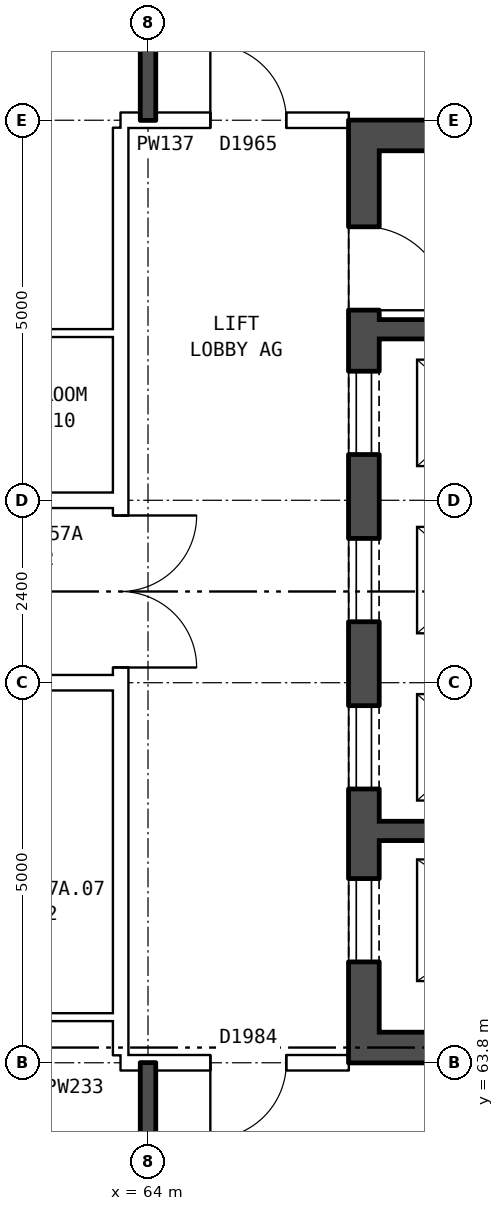
"""IFC4 building model, lengths in metres.
Left out: names, types, materials, properties, quantities, classifications, styles, units other than length and angle.
Written with IfcOpenShell. Run it as: python <this file> out.ifc"""

import sys

from ifc_helpers import new_model, si_unit, direction, frame, frame_2d, origin, place, context, subcontext, project, spatial, rectangle, extrude, element, fill, save


model = new_model("IFC4")
c1 = context("Model", 3, precision=1e-05, world=origin(), true_north=direction((0.0, 1.0)))
c2 = subcontext(c1, "Body", "Model", "MODEL_VIEW")
j1 = project(units=[si_unit("LENGTHUNIT", "METRE"), si_unit("PLANEANGLEUNIT", "RADIAN")], contexts=[c1])
p1 = place(None, origin())
s1 = spatial("IfcSite", under=j1, at=p1, CompositionType="ELEMENT")
p2 = place(p1, origin())
s2 = spatial("IfcBuilding", under=s1, at=p2, CompositionType="ELEMENT")
p3 = place(p2, frame((0.0, 0.0, 202.8)))
s3 = spatial("IfcBuildingStorey", under=s2, at=p3, CompositionType="ELEMENT", Elevation=202.8)
p4 = place(p3, frame((66.84, 63.8, 0.0), z_axis=(0.0, 0.0, 1.0), x_axis=(0.0, 1.0, 0.0)))
e1 = element("IfcWall", 1, at=p4, inside=s3, PredefinedType="SHEAR", context=c2, shape_type="SweptSolid", body=[
    extrude(rectangle(XDim=12.4, YDim=0.4, at=frame_2d((6.2, 0.0))), origin(), (0.0, 0.0, 1.0), 2.85),
])
p5 = place(p4, frame((1.325, 0.0, 0.0)))
e2 = element("IfcOpeningElement", 2, at=p5, cuts=e1, PredefinedType="OPENING", context=c2, shape_type="SweptSolid", body=[
    extrude(rectangle(XDim=1.1, YDim=2.1, at=frame_2d((0.55, 1.05))), frame((0.0, 0.21, 0.0), z_axis=(0.0, -1.0, 0.0), x_axis=(1.0, 0.0, 0.0)), (0.0, 0.0, 1.0), 0.42),
])
p6 = place(p4, frame((3.6, 0.0, 0.0)))
e3 = element("IfcOpeningElement", 3, at=p6, cuts=e1, PredefinedType="OPENING", context=c2, shape_type="SweptSolid", body=[
    extrude(rectangle(XDim=1.1, YDim=2.1, at=frame_2d((0.55, 1.05))), frame((0.0, 0.21, 0.0), z_axis=(0.0, -1.0, 0.0), x_axis=(1.0, 0.0, 0.0)), (0.0, 0.0, 1.0), 0.42),
])
p7 = place(p4, frame((5.8, 0.0, 0.0)))
e4 = element("IfcOpeningElement", 4, at=p7, cuts=e1, PredefinedType="OPENING", context=c2, shape_type="SweptSolid", body=[
    extrude(rectangle(XDim=1.1, YDim=2.1, at=frame_2d((0.55, 1.05))), frame((0.0, 0.21, 0.0), z_axis=(0.0, -1.0, 0.0), x_axis=(1.0, 0.0, 0.0)), (0.0, 0.0, 1.0), 0.42),
])
p8 = place(p4, frame((8.0, 0.0, 0.0)))
e5 = element("IfcOpeningElement", 5, at=p8, cuts=e1, PredefinedType="OPENING", context=c2, shape_type="SweptSolid", body=[
    extrude(rectangle(XDim=1.1, YDim=2.1, at=frame_2d((0.55, 1.05))), frame((0.0, 0.21, 0.0), z_axis=(0.0, -1.0, 0.0), x_axis=(1.0, 0.0, 0.0)), (0.0, 0.0, 1.0), 0.42),
])
p9 = place(p4, frame((9.9, 0.0, 0.0)))
e6 = element("IfcOpeningElement", 6, at=p9, cuts=e1, PredefinedType="OPENING", context=c2, shape_type="SweptSolid", body=[
    extrude(rectangle(XDim=1.1, YDim=2.1, at=frame_2d((0.55, 1.05))), frame((0.0, 0.21, 0.0), z_axis=(0.0, -1.0, 0.0), x_axis=(1.0, 0.0, 0.0)), (0.0, 0.0, 1.0), 0.42),
])
for number, where, z_axis, x_axis in (
    (7, (67.04, 64.0, 0.0), (0.0, 0.0, 1.0), (1.0, 0.0, 0.0)),
    (8, (67.04, 76.0, 0.0), (0.0, 0.0, 1.0), (1.0, 0.0, 0.0)),
):
    element("IfcWall", number, at=place(p3, frame(where, z_axis=z_axis, x_axis=x_axis)), inside=s3, PredefinedType="SHEAR", context=c2, shape_type="SweptSolid", body=[
        extrude(rectangle(XDim=8.2, YDim=0.4, at=frame_2d((4.1, 0.0))), origin(), (0.0, 0.0, 1.0), 2.85),
    ])
p10 = place(p3, frame((67.04, 66.85, 0.0), z_axis=(0.0, 0.0, 1.0), x_axis=(1.0, 0.0, 0.0)))
e9 = element("IfcWall", 9, at=p10, inside=s3, PredefinedType="SHEAR", context=c2, shape_type="SweptSolid", body=[
    extrude(rectangle(XDim=3.595, YDim=0.25, at=frame_2d((1.797, 0.0))), origin(), (0.0, 0.0, 1.0), 2.85),
])
p11 = place(p3, frame((67.04, 73.45, 0.0), z_axis=(0.0, 0.0, 1.0), x_axis=(1.0, 0.0, 0.0)))
e10 = element("IfcWall", 10, at=p11, inside=s3, PredefinedType="SHEAR", context=c2, shape_type="SweptSolid", body=[
    extrude(rectangle(XDim=2.525, YDim=0.25, at=frame_2d((1.262, 0.0))), origin(), (0.0, 0.0, 1.0), 2.85),
])
p12 = place(p3, frame((63.64, 63.9, 0.0), z_axis=(0.0, 0.0, 1.0), x_axis=(0.0, 1.0, 0.0)))
e11 = element("IfcWall", 11, at=p12, inside=s3, PredefinedType="PARTITIONING", context=c2, shape_type="SweptSolid", body=[
    extrude(rectangle(XDim=12.2, YDim=0.2, at=frame_2d((6.1, 0.0))), origin(), (0.0, 0.0, 1.0), 2.85),
])
p13 = place(p12, frame((5.1, 0.0, 0.0)))
e12 = element("IfcOpeningElement", 12, at=p13, cuts=e11, PredefinedType="OPENING", context=c2, shape_type="SweptSolid", body=[
    extrude(rectangle(XDim=2.0, YDim=2.1, at=frame_2d((1.0, 1.05))), frame((0.0, 0.11, 0.0), z_axis=(0.0, -1.0, 0.0), x_axis=(1.0, 0.0, 0.0)), (0.0, 0.0, 1.0), 0.22),
])
p14 = place(p3, frame((63.64, 63.8, 0.0), z_axis=(0.0, 0.0, 1.0), x_axis=(1.0, 0.0, 0.0)))
e13 = element("IfcWall", 13, at=p14, inside=s3, PredefinedType="PARTITIONING", context=c2, shape_type="SweptSolid", body=[
    extrude(rectangle(XDim=3.0, YDim=0.2, at=frame_2d((1.5, 0.0))), origin(), (0.0, 0.0, 1.0), 2.85),
])
p15 = place(p14, frame((1.18, 0.0, 0.0)))
e14 = element("IfcOpeningElement", 14, at=p15, cuts=e13, PredefinedType="OPENING", context=c2, shape_type="SweptSolid", body=[
    extrude(rectangle(XDim=1.0, YDim=2.1, at=frame_2d((0.5, 1.05))), frame((0.0, 0.11, 0.0), z_axis=(0.0, -1.0, 0.0), x_axis=(1.0, 0.0, 0.0)), (0.0, 0.0, 1.0), 0.22),
])
p16 = place(p3, frame((61.0, 64.4, 0.0), z_axis=(0.0, 0.0, 1.0), x_axis=(1.0, 0.0, 0.0)))
e15 = element("IfcWall", 15, at=p16, inside=s3, PredefinedType="PARTITIONING", context=c2, shape_type="SweptSolid", body=[
    extrude(rectangle(XDim=2.64, YDim=0.1, at=frame_2d((1.32, 0.0))), origin(), (0.0, 0.0, 1.0), 2.85),
])
p17 = place(p3, frame((44.36, 68.8, 0.0), z_axis=(0.0, 0.0, 1.0), x_axis=(1.0, 0.0, 0.0)))
e16 = element("IfcWall", 16, at=p17, inside=s3, PredefinedType="PARTITIONING", context=c2, shape_type="SweptSolid", body=[
    extrude(rectangle(XDim=19.28, YDim=0.2, at=frame_2d((9.64, 0.0))), origin(), (0.0, 0.0, 1.0), 2.85),
])
p18 = place(p17, frame((14.64, 0.0, 0.0)))
e17 = element("IfcOpeningElement", 17, at=p18, cuts=e16, PredefinedType="OPENING", context=c2, shape_type="SweptSolid", body=[
    extrude(rectangle(XDim=1.0, YDim=2.1, at=frame_2d((0.5, 1.05))), frame((0.0, 0.11, 0.0), z_axis=(0.0, -1.0, 0.0), x_axis=(1.0, 0.0, 0.0)), (0.0, 0.0, 1.0), 0.22),
])
p19 = place(p17, frame((8.64, 0.0, 0.0)))
e18 = element("IfcOpeningElement", 18, at=p19, cuts=e16, PredefinedType="OPENING", context=c2, shape_type="SweptSolid", body=[
    extrude(rectangle(XDim=1.0, YDim=2.1, at=frame_2d((0.5, 1.05))), frame((0.0, 0.11, 0.0), z_axis=(0.0, -1.0, 0.0), x_axis=(1.0, 0.0, 0.0)), (0.0, 0.0, 1.0), 0.22),
])
p20 = place(p17, frame((2.64, 0.0, 0.0)))
e19 = element("IfcOpeningElement", 19, at=p20, cuts=e16, PredefinedType="OPENING", context=c2, shape_type="SweptSolid", body=[
    extrude(rectangle(XDim=1.0, YDim=2.1, at=frame_2d((0.5, 1.05))), frame((0.0, 0.11, 0.0), z_axis=(0.0, -1.0, 0.0), x_axis=(1.0, 0.0, 0.0)), (0.0, 0.0, 1.0), 0.22),
])
p21 = place(p3, frame((44.36, 71.2, 0.0), z_axis=(0.0, 0.0, 1.0), x_axis=(1.0, 0.0, 0.0)))
e20 = element("IfcWall", 20, at=p21, inside=s3, PredefinedType="PARTITIONING", context=c2, shape_type="SweptSolid", body=[
    extrude(rectangle(XDim=19.28, YDim=0.2, at=frame_2d((9.64, 0.0))), origin(), (0.0, 0.0, 1.0), 2.85),
])
p22 = place(p21, frame((14.64, 0.0, 0.0)))
e21 = element("IfcOpeningElement", 21, at=p22, cuts=e20, PredefinedType="OPENING", context=c2, shape_type="SweptSolid", body=[
    extrude(rectangle(XDim=1.0, YDim=2.1, at=frame_2d((0.5, 1.05))), frame((0.0, 0.11, 0.0), z_axis=(0.0, -1.0, 0.0), x_axis=(1.0, 0.0, 0.0)), (0.0, 0.0, 1.0), 0.22),
])
p23 = place(p21, frame((5.64, 0.0, 0.0)))
e22 = element("IfcOpeningElement", 22, at=p23, cuts=e20, PredefinedType="OPENING", context=c2, shape_type="SweptSolid", body=[
    extrude(rectangle(XDim=1.0, YDim=2.1, at=frame_2d((0.5, 1.05))), frame((0.0, 0.11, 0.0), z_axis=(0.0, -1.0, 0.0), x_axis=(1.0, 0.0, 0.0)), (0.0, 0.0, 1.0), 0.22),
])
p24 = place(p3, frame((61.0, 73.4, 0.0), z_axis=(0.0, 0.0, 1.0), x_axis=(1.0, 0.0, 0.0)))
e23 = element("IfcWall", 23, at=p24, inside=s3, PredefinedType="PARTITIONING", context=c2, shape_type="SweptSolid", body=[
    extrude(rectangle(XDim=2.64, YDim=0.1, at=frame_2d((1.32, 0.0))), origin(), (0.0, 0.0, 1.0), 2.85),
])
p25 = place(p3, frame((63.64, 76.2, 0.0), z_axis=(0.0, 0.0, 1.0), x_axis=(1.0, 0.0, 0.0)))
e24 = element("IfcWall", 24, at=p25, inside=s3, PredefinedType="PARTITIONING", context=c2, shape_type="SweptSolid", body=[
    extrude(rectangle(XDim=3.0, YDim=0.2, at=frame_2d((1.5, 0.0))), origin(), (0.0, 0.0, 1.0), 2.85),
])
p26 = place(p25, frame((1.18, 0.0, 0.0)))
e25 = element("IfcOpeningElement", 25, at=p26, cuts=e24, PredefinedType="OPENING", context=c2, shape_type="SweptSolid", body=[
    extrude(rectangle(XDim=1.0, YDim=2.1, at=frame_2d((0.5, 1.05))), frame((0.0, 0.11, 0.0), z_axis=(0.0, -1.0, 0.0), x_axis=(1.0, 0.0, 0.0)), (0.0, 0.0, 1.0), 0.22),
])
for number, where, z_axis, x_axis in (
    (26, (64.0, 54.36, 0.0), (0.0, 0.0, 1.0), (0.0, 1.0, 0.0)),
    (27, (64.0, 76.2, 0.0), (0.0, 0.0, 1.0), (0.0, 1.0, 0.0)),
):
    element("IfcWall", number, at=place(p3, frame(where, z_axis=z_axis, x_axis=x_axis)), inside=s3, PredefinedType="SOLIDWALL", context=c2, shape_type="SweptSolid", body=[
        extrude(rectangle(XDim=9.44, YDim=0.2, at=frame_2d((4.72, 0.0))), origin(), (0.0, 0.0, 1.0), 2.85),
    ])
p27 = place(p5, origin())
e28 = element("IfcDoor", 28, at=p27, inside=s3, OperationType="DOUBLE_DOOR_SLIDING", PredefinedType="DOOR", context=c2, shape_type="SweptSolid", body=[
    extrude(rectangle(XDim=1.1, YDim=2.1, at=frame_2d((0.55, 1.05))), frame((0.0, -0.135, 0.0), z_axis=(0.0, -1.0, 0.0), x_axis=(1.0, 0.0, 0.0)), (0.0, 0.0, 1.0), 0.05),
])
fill(e2, e28)
p28 = place(p6, origin())
e29 = element("IfcDoor", 29, at=p28, inside=s3, OperationType="DOUBLE_DOOR_SLIDING", PredefinedType="DOOR", context=c2, shape_type="SweptSolid", body=[
    extrude(rectangle(XDim=1.1, YDim=2.1, at=frame_2d((0.55, 1.05))), frame((0.0, -0.135, 0.0), z_axis=(0.0, -1.0, 0.0), x_axis=(1.0, 0.0, 0.0)), (0.0, 0.0, 1.0), 0.05),
])
fill(e3, e29)
p29 = place(p7, origin())
e30 = element("IfcDoor", 30, at=p29, inside=s3, OperationType="DOUBLE_DOOR_SLIDING", PredefinedType="DOOR", context=c2, shape_type="SweptSolid", body=[
    extrude(rectangle(XDim=1.1, YDim=2.1, at=frame_2d((0.55, 1.05))), frame((0.0, -0.135, 0.0), z_axis=(0.0, -1.0, 0.0), x_axis=(1.0, 0.0, 0.0)), (0.0, 0.0, 1.0), 0.05),
])
fill(e4, e30)
p30 = place(p8, origin())
e31 = element("IfcDoor", 31, at=p30, inside=s3, OperationType="DOUBLE_DOOR_SLIDING", PredefinedType="DOOR", context=c2, shape_type="SweptSolid", body=[
    extrude(rectangle(XDim=1.1, YDim=2.1, at=frame_2d((0.55, 1.05))), frame((0.0, -0.135, 0.0), z_axis=(0.0, -1.0, 0.0), x_axis=(1.0, 0.0, 0.0)), (0.0, 0.0, 1.0), 0.05),
])
fill(e5, e31)
p31 = place(p9, frame((1.1, 0.0, 0.0), z_axis=(0.0, 0.0, 1.0), x_axis=(-1.0, 0.0, 0.0)))
e32 = element("IfcDoor", 32, at=p31, inside=s3, OperationType="SINGLE_SWING_RIGHT", PredefinedType="DOOR", context=c2, shape_type="SweptSolid", body=[
    extrude(rectangle(XDim=1.1, YDim=2.1, at=frame_2d((0.55, 1.05))), frame((0.0, 0.185, 0.0), z_axis=(0.0, -1.0, 0.0), x_axis=(1.0, 0.0, 0.0)), (0.0, 0.0, 1.0), 0.05),
])
fill(e6, e32)
p32 = place(p13, frame((2.0, 0.0, 0.0), z_axis=(0.0, 0.0, 1.0), x_axis=(-1.0, 0.0, 0.0)))
e33 = element("IfcDoor", 33, at=p32, inside=s3, OperationType="DOUBLE_DOOR_SINGLE_SWING", PredefinedType="DOOR", context=c2, shape_type="SweptSolid", body=[
    extrude(rectangle(XDim=2.0, YDim=2.1, at=frame_2d((1.0, 1.05))), frame((0.0, 0.025, 0.0), z_axis=(0.0, -1.0, 0.0), x_axis=(1.0, 0.0, 0.0)), (0.0, 0.0, 1.0), 0.05),
])
fill(e12, e33)
p33 = place(p15, frame((1.0, 0.0, 0.0), z_axis=(0.0, 0.0, 1.0), x_axis=(-1.0, 0.0, 0.0)))
e34 = element("IfcDoor", 34, at=p33, inside=s3, OperationType="SINGLE_SWING_RIGHT", PredefinedType="DOOR", context=c2, shape_type="SweptSolid", body=[
    extrude(rectangle(XDim=1.0, YDim=2.1, at=frame_2d((0.5, 1.05))), frame((0.0, 0.025, 0.0), z_axis=(0.0, -1.0, 0.0), x_axis=(1.0, 0.0, 0.0)), (0.0, 0.0, 1.0), 0.05),
])
fill(e14, e34)
p34 = place(p26, origin())
e35 = element("IfcDoor", 35, at=p34, inside=s3, OperationType="SINGLE_SWING_LEFT", PredefinedType="DOOR", context=c2, shape_type="SweptSolid", body=[
    extrude(rectangle(XDim=1.0, YDim=2.1, at=frame_2d((0.5, 1.05))), frame((0.0, 0.025, 0.0), z_axis=(0.0, -1.0, 0.0), x_axis=(1.0, 0.0, 0.0)), (0.0, 0.0, 1.0), 0.05),
])
fill(e25, e35)
save(model, sys.argv[1])
